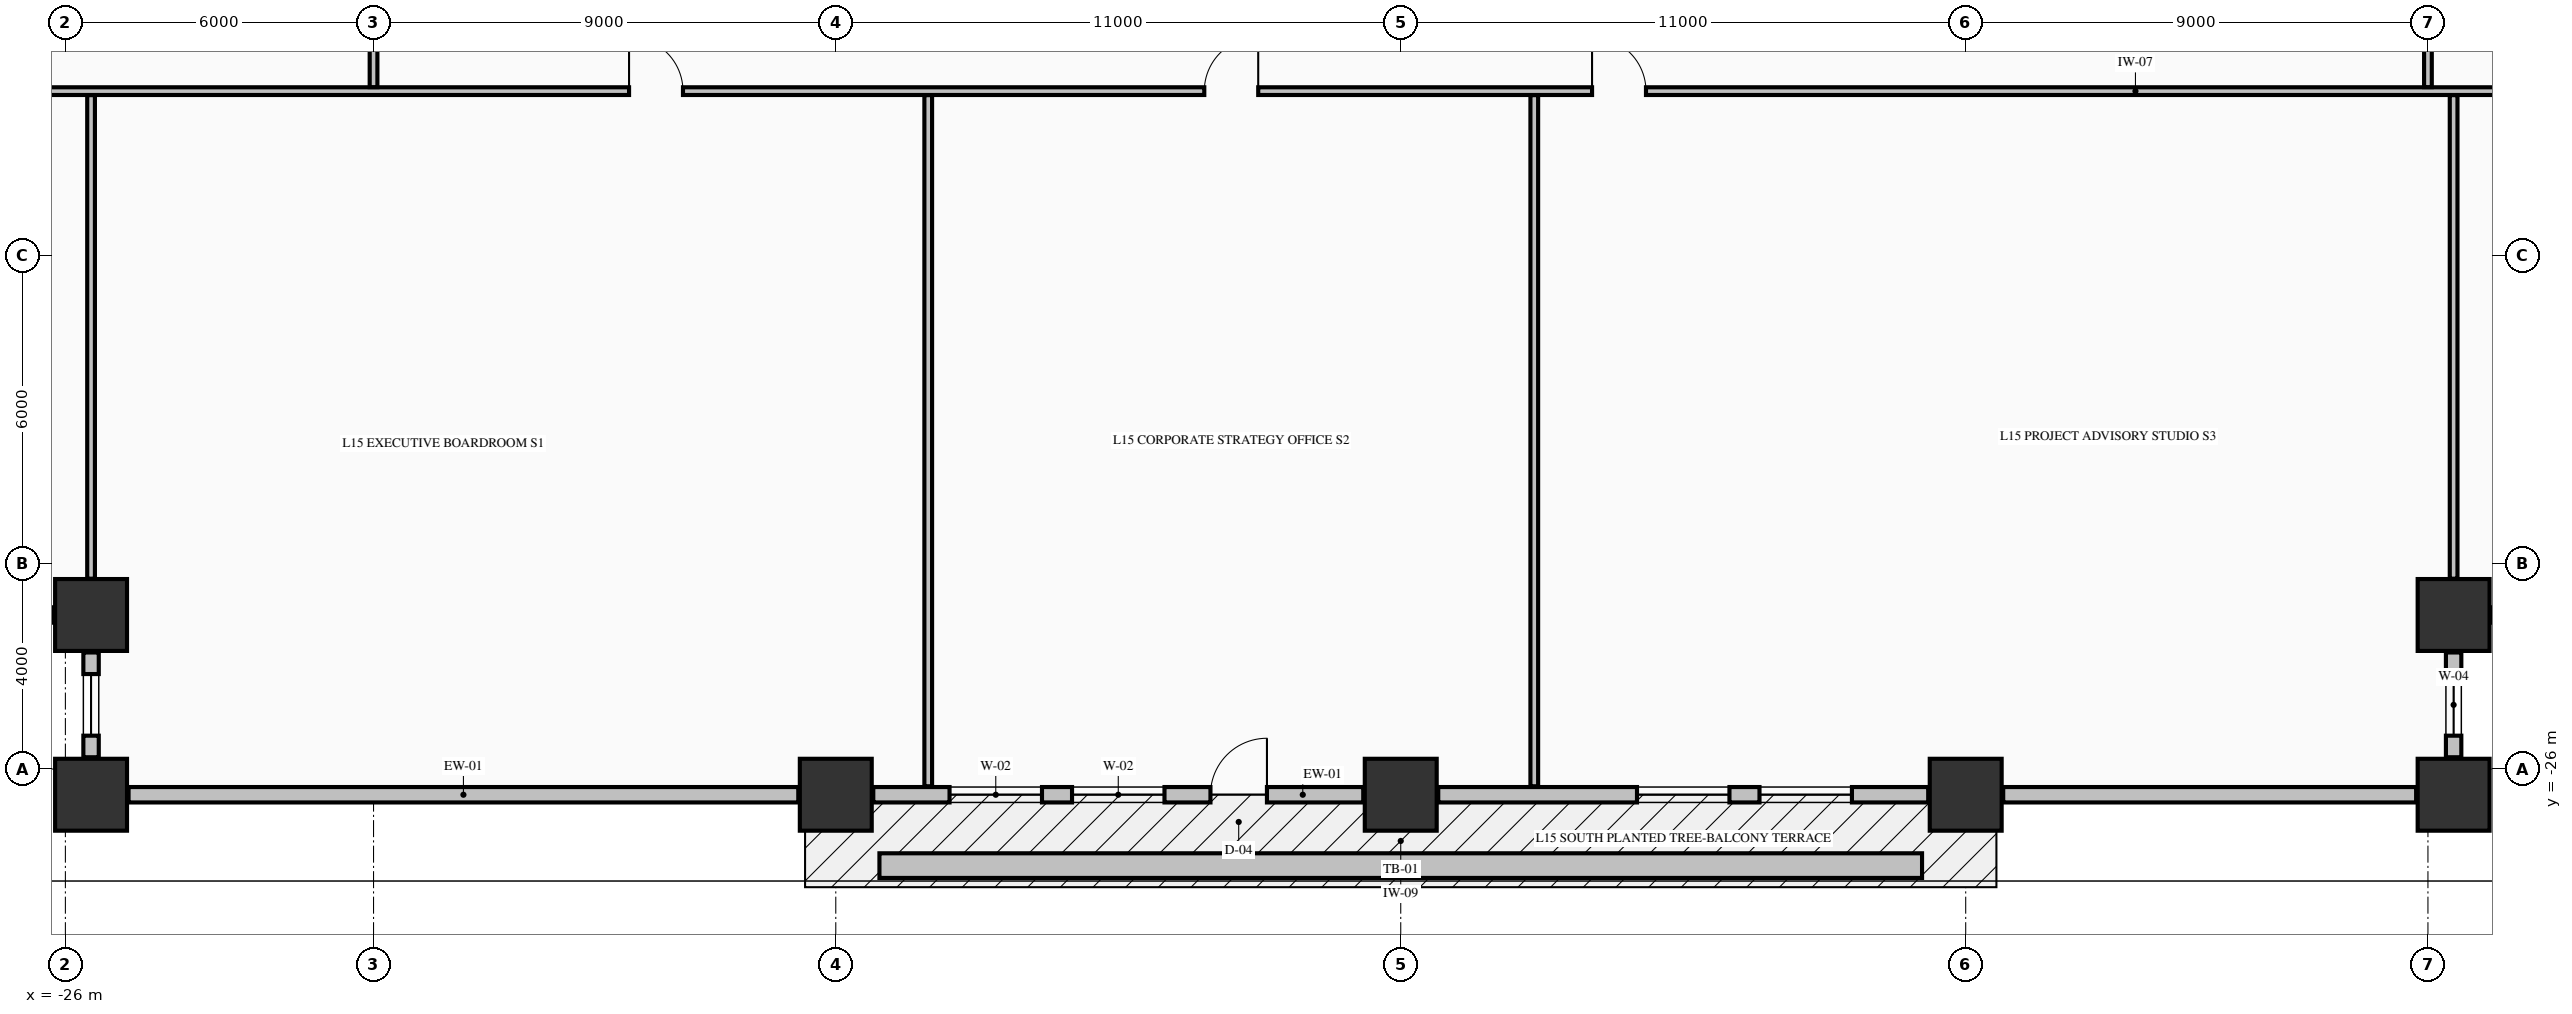
"""IFC4 building model, lengths in metres.
Left out: names, types, materials, properties, quantities, classifications, styles, units other than length and angle.
Written with IfcOpenShell. Run it as: python <this file> out.ifc"""

import sys

from ifc_helpers import new_model, si_unit, direction, frame, frame_2d, origin, origin_2d, place, context, subcontext, project, spatial, rectangle, extrude, element, fill, save


model = new_model("IFC4")
c1 = context("Model", 3, precision=1e-05, world=origin(), true_north=direction((0.0, 1.0)))
c2 = subcontext(c1, "Body", "Model", "MODEL_VIEW")
j1 = project(units=[si_unit("LENGTHUNIT", "METRE"), si_unit("PLANEANGLEUNIT", "RADIAN")], contexts=[c1])
p1 = place(None, origin())
s1 = spatial("IfcSite", under=j1, at=p1, CompositionType="ELEMENT")
p2 = place(p1, origin())
s2 = spatial("IfcBuilding", under=s1, at=p2, CompositionType="ELEMENT")
p3 = place(p2, frame((0.0, 0.0, 64.33)))
s3 = spatial("IfcBuildingStorey", under=s2, at=p3, CompositionType="ELEMENT", Elevation=64.33)
for number, where, z_axis, x_axis in (
    (1, (-25.5, -26.5, -0.25), (0.0, 0.0, 1.0), (1.0, 0.0, 0.0)),
    (2, (-11.0, -26.5, -0.25), (0.0, 0.0, 1.0), (1.0, 0.0, 0.0)),
    (3, (0.0, -26.5, -0.25), (0.0, 0.0, 1.0), (1.0, 0.0, 0.0)),
    (4, (11.0, -26.5, -0.25), (0.0, 0.0, 1.0), (1.0, 0.0, 0.0)),
    (5, (20.5, -26.5, -0.25), (0.0, 0.0, 1.0), (1.0, 0.0, 0.0)),
    (6, (-25.5, -23.0, -0.25), (0.0, 0.0, 1.0), (1.0, 0.0, 0.0)),
    (7, (20.5, -23.0, -0.25), (0.0, 0.0, 1.0), (1.0, 0.0, 0.0)),
):
    element("IfcColumn", number, at=place(p3, frame(where, z_axis=z_axis, x_axis=x_axis)), inside=s3, PredefinedType="COLUMN", context=c2, shape_type="SweptSolid", body=[
        extrude(rectangle(XDim=1.4, YDim=1.4, at=origin_2d()), origin(), (0.0, 0.0, 1.0), 3.57),
    ])
p4 = place(p3, frame((20.5, -25.77, 0.0), z_axis=(0.0, 0.0, 1.0), x_axis=(0.0, 1.0, 0.0)))
e8 = element("IfcWall", 8, at=p4, inside=s3, PredefinedType="STANDARD", context=c2, shape_type="SweptSolid", body=[
    extrude(rectangle(XDim=2.04, YDim=0.3, at=frame_2d((1.02, 0.0))), origin(), (0.0, 0.0, 1.0), 2.712),
])
p5 = place(p4, frame((0.42, 0.0, 0.82)))
e9 = element("IfcOpeningElement", 9, at=p5, cuts=e8, PredefinedType="OPENING", context=c2, shape_type="SweptSolid", body=[
    extrude(rectangle(XDim=1.2, YDim=1.65, at=frame_2d((0.6, 0.825))), frame((0.0, 0.16, 0.0), z_axis=(0.0, -1.0, 0.0), x_axis=(1.0, 0.0, 0.0)), (0.0, 0.0, 1.0), 0.32),
])
p6 = place(p3, frame((21.23, -23.0, 0.0), z_axis=(0.0, 0.0, 1.0), x_axis=(1.0, 0.0, 0.0)))
e10 = element("IfcWall", 10, at=p6, inside=s3, PredefinedType="STANDARD", context=c2, shape_type="SweptSolid", body=[
    extrude(rectangle(XDim=2.04, YDim=0.3, at=frame_2d((1.02, 0.0))), origin(), (0.0, 0.0, 1.0), 2.712),
])
p7 = place(p6, frame((0.42, 0.0, 0.82)))
e11 = element("IfcOpeningElement", 11, at=p7, cuts=e10, PredefinedType="OPENING", context=c2, shape_type="SweptSolid", body=[
    extrude(rectangle(XDim=1.2, YDim=1.65, at=frame_2d((0.6, 0.825))), frame((0.0, 0.16, 0.0), z_axis=(0.0, -1.0, 0.0), x_axis=(1.0, 0.0, 0.0)), (0.0, 0.0, 1.0), 0.32),
])
p8 = place(p3, frame((-28.27, -23.0, 0.0), z_axis=(0.0, 0.0, 1.0), x_axis=(1.0, 0.0, 0.0)))
e12 = element("IfcWall", 12, at=p8, inside=s3, PredefinedType="STANDARD", context=c2, shape_type="SweptSolid", body=[
    extrude(rectangle(XDim=2.04, YDim=0.3, at=frame_2d((1.02, 0.0))), origin(), (0.0, 0.0, 1.0), 2.712),
])
p9 = place(p8, frame((0.42, 0.0, 0.82)))
e13 = element("IfcOpeningElement", 13, at=p9, cuts=e12, PredefinedType="OPENING", context=c2, shape_type="SweptSolid", body=[
    extrude(rectangle(XDim=1.2, YDim=1.65, at=frame_2d((0.6, 0.825))), frame((0.0, 0.16, 0.0), z_axis=(0.0, -1.0, 0.0), x_axis=(1.0, 0.0, 0.0)), (0.0, 0.0, 1.0), 0.32),
])
p10 = place(p3, frame((-25.5, -23.73, 0.0), z_axis=(0.0, 0.0, 1.0), x_axis=(0.0, -1.0, 0.0)))
e14 = element("IfcWall", 14, at=p10, inside=s3, PredefinedType="STANDARD", context=c2, shape_type="SweptSolid", body=[
    extrude(rectangle(XDim=2.04, YDim=0.3, at=frame_2d((1.02, 0.0))), origin(), (0.0, 0.0, 1.0), 2.712),
])
p11 = place(p10, frame((0.42, 0.0, 0.82)))
e15 = element("IfcOpeningElement", 15, at=p11, cuts=e14, PredefinedType="OPENING", context=c2, shape_type="SweptSolid", body=[
    extrude(rectangle(XDim=1.2, YDim=1.65, at=frame_2d((0.6, 0.825))), frame((0.0, 0.16, 0.0), z_axis=(0.0, -1.0, 0.0), x_axis=(1.0, 0.0, 0.0)), (0.0, 0.0, 1.0), 0.32),
])
p12 = place(p3, frame((-24.77, -26.5, 0.0), z_axis=(0.0, 0.0, 1.0), x_axis=(1.0, 0.0, 0.0)))
e16 = element("IfcWall", 16, at=p12, inside=s3, PredefinedType="STANDARD", context=c2, shape_type="SweptSolid", body=[
    extrude(rectangle(XDim=13.04, YDim=0.3, at=frame_2d((6.52, 0.0))), origin(), (0.0, 0.0, 1.0), 2.712),
])
p13 = place(p3, frame((-10.27, -26.5, 0.0), z_axis=(0.0, 0.0, 1.0), x_axis=(1.0, 0.0, 0.0)))
e17 = element("IfcWall", 17, at=p13, inside=s3, PredefinedType="STANDARD", context=c2, shape_type="SweptSolid", body=[
    extrude(rectangle(XDim=9.54, YDim=0.3, at=frame_2d((4.77, 0.0))), origin(), (0.0, 0.0, 1.0), 2.712),
])
p14 = place(p13, frame((6.565, 0.0, 0.0)))
e18 = element("IfcOpeningElement", 18, at=p14, cuts=e17, PredefinedType="OPENING", context=c2, shape_type="SweptSolid", body=[
    extrude(rectangle(XDim=1.1, YDim=2.15, at=frame_2d((0.55, 1.075))), frame((0.0, 0.16, 0.0), z_axis=(0.0, -1.0, 0.0), x_axis=(1.0, 0.0, 0.0)), (0.0, 0.0, 1.0), 0.32),
])
p15 = place(p13, frame((1.485, 0.0, 0.78)))
e19 = element("IfcOpeningElement", 19, at=p15, cuts=e17, PredefinedType="OPENING", context=c2, shape_type="SweptSolid", body=[
    extrude(rectangle(XDim=1.8, YDim=1.72, at=frame_2d((0.9, 0.86))), frame((0.0, 0.16, 0.0), z_axis=(0.0, -1.0, 0.0), x_axis=(1.0, 0.0, 0.0)), (0.0, 0.0, 1.0), 0.32),
])
p16 = place(p13, frame((3.87, 0.0, 0.78)))
e20 = element("IfcOpeningElement", 20, at=p16, cuts=e17, PredefinedType="OPENING", context=c2, shape_type="SweptSolid", body=[
    extrude(rectangle(XDim=1.8, YDim=1.72, at=frame_2d((0.9, 0.86))), frame((0.0, 0.16, 0.0), z_axis=(0.0, -1.0, 0.0), x_axis=(1.0, 0.0, 0.0)), (0.0, 0.0, 1.0), 0.32),
])
p17 = place(p3, frame((0.73, -26.5, 0.0), z_axis=(0.0, 0.0, 1.0), x_axis=(1.0, 0.0, 0.0)))
e21 = element("IfcWall", 21, at=p17, inside=s3, PredefinedType="STANDARD", context=c2, shape_type="SweptSolid", body=[
    extrude(rectangle(XDim=9.54, YDim=0.3, at=frame_2d((4.77, 0.0))), origin(), (0.0, 0.0, 1.0), 2.712),
])
p18 = place(p17, frame((3.87, 0.0, 0.78)))
e22 = element("IfcOpeningElement", 22, at=p18, cuts=e21, PredefinedType="OPENING", context=c2, shape_type="SweptSolid", body=[
    extrude(rectangle(XDim=1.8, YDim=1.72, at=frame_2d((0.9, 0.86))), frame((0.0, 0.16, 0.0), z_axis=(0.0, -1.0, 0.0), x_axis=(1.0, 0.0, 0.0)), (0.0, 0.0, 1.0), 0.32),
])
p19 = place(p17, frame((6.255, 0.0, 0.78)))
e23 = element("IfcOpeningElement", 23, at=p19, cuts=e21, PredefinedType="OPENING", context=c2, shape_type="SweptSolid", body=[
    extrude(rectangle(XDim=1.8, YDim=1.72, at=frame_2d((0.9, 0.86))), frame((0.0, 0.16, 0.0), z_axis=(0.0, -1.0, 0.0), x_axis=(1.0, 0.0, 0.0)), (0.0, 0.0, 1.0), 0.32),
])
p20 = place(p3, frame((11.73, -26.5, 0.0), z_axis=(0.0, 0.0, 1.0), x_axis=(1.0, 0.0, 0.0)))
e24 = element("IfcWall", 24, at=p20, inside=s3, PredefinedType="STANDARD", context=c2, shape_type="SweptSolid", body=[
    extrude(rectangle(XDim=8.04, YDim=0.3, at=frame_2d((4.02, 0.0))), origin(), (0.0, 0.0, 1.0), 2.712),
])
p21 = place(p3, frame((-28.835, -12.8, 0.0), z_axis=(0.0, 0.0, 1.0), x_axis=(1.0, 0.0, 0.0)))
e25 = element("IfcWall", 25, at=p21, inside=s3, PredefinedType="PARTITIONING", context=c2, shape_type="SweptSolid", body=[
    extrude(rectangle(XDim=52.67, YDim=0.15, at=frame_2d((26.335, 0.0))), origin(), (0.0, 0.0, 1.0), 3.32),
])
p22 = place(p21, frame((13.81, 0.0, 0.0)))
e26 = element("IfcOpeningElement", 26, at=p22, cuts=e25, PredefinedType="OPENING", context=c2, shape_type="SweptSolid", body=[
    extrude(rectangle(XDim=1.05, YDim=2.15, at=frame_2d((0.525, 1.075))), frame((0.0, 0.085, 0.0), z_axis=(0.0, -1.0, 0.0), x_axis=(1.0, 0.0, 0.0)), (0.0, 0.0, 1.0), 0.17),
])
p23 = place(p21, frame((25.01, 0.0, 0.0)))
e27 = element("IfcOpeningElement", 27, at=p23, cuts=e25, PredefinedType="OPENING", context=c2, shape_type="SweptSolid", body=[
    extrude(rectangle(XDim=1.05, YDim=2.15, at=frame_2d((0.525, 1.075))), frame((0.0, 0.085, 0.0), z_axis=(0.0, -1.0, 0.0), x_axis=(1.0, 0.0, 0.0)), (0.0, 0.0, 1.0), 0.17),
])
p24 = place(p21, frame((32.56, 0.0, 0.0)))
e28 = element("IfcOpeningElement", 28, at=p24, cuts=e25, PredefinedType="OPENING", context=c2, shape_type="SweptSolid", body=[
    extrude(rectangle(XDim=1.05, YDim=2.15, at=frame_2d((0.525, 1.075))), frame((0.0, 0.085, 0.0), z_axis=(0.0, -1.0, 0.0), x_axis=(1.0, 0.0, 0.0)), (0.0, 0.0, 1.0), 0.17),
])
p25 = place(p3, frame((-25.5, -22.294, 0.0), z_axis=(0.0, 0.0, 1.0), x_axis=(0.0, 1.0, 0.0)))
e29 = element("IfcWall", 29, at=p25, inside=s3, PredefinedType="PARTITIONING", context=c2, shape_type="SweptSolid", body=[
    extrude(rectangle(XDim=9.416, YDim=0.15, at=frame_2d((4.708, 0.0))), origin(), (0.0, 0.0, 1.0), 3.32),
])
p26 = place(p3, frame((-20.0, -12.722, 0.0), z_axis=(0.0, 0.0, 1.0), x_axis=(0.0, 1.0, 0.0)))
e30 = element("IfcWall", 30, at=p26, inside=s3, PredefinedType="PARTITIONING", context=c2, shape_type="SweptSolid", body=[
    extrude(rectangle(XDim=2.166, YDim=0.15, at=frame_2d((1.083, 0.0))), origin(), (0.0, 0.0, 1.0), 2.66),
])
p27 = place(p26, frame((0.867, 0.0, 0.0)))
e31 = element("IfcOpeningElement", 31, at=p27, cuts=e30, PredefinedType="OPENING", context=c2, shape_type="SweptSolid", body=[
    extrude(rectangle(XDim=0.95, YDim=2.15, at=frame_2d((0.475, 1.075))), frame((0.0, 0.085, 0.0), z_axis=(0.0, -1.0, 0.0), x_axis=(1.0, 0.0, 0.0)), (0.0, 0.0, 1.0), 0.17),
])
for number, where, z_axis, x_axis in (
    (32, (-9.2, -26.335, 0.0), (0.0, 0.0, 1.0), (0.0, 1.0, 0.0)),
    (33, (2.6, -26.335, 0.0), (0.0, 0.0, 1.0), (0.0, 1.0, 0.0)),
):
    element("IfcWall", number, at=place(p3, frame(where, z_axis=z_axis, x_axis=x_axis)), inside=s3, PredefinedType="PARTITIONING", context=c2, shape_type="SweptSolid", body=[
        extrude(rectangle(XDim=13.457, YDim=0.15, at=frame_2d((6.729, 0.0))), origin(), (0.0, 0.0, 1.0), 3.32),
    ])
p28 = place(p3, frame((20.0, -12.722, 0.0), z_axis=(0.0, 0.0, 1.0), x_axis=(0.0, 1.0, 0.0)))
e34 = element("IfcWall", 34, at=p28, inside=s3, PredefinedType="PARTITIONING", context=c2, shape_type="SweptSolid", body=[
    extrude(rectangle(XDim=2.166, YDim=0.15, at=frame_2d((1.083, 0.0))), origin(), (0.0, 0.0, 1.0), 3.32),
])
p29 = place(p28, frame((0.867, 0.0, 0.0)))
e35 = element("IfcOpeningElement", 35, at=p29, cuts=e34, PredefinedType="OPENING", context=c2, shape_type="SweptSolid", body=[
    extrude(rectangle(XDim=0.95, YDim=2.15, at=frame_2d((0.475, 1.075))), frame((0.0, 0.085, 0.0), z_axis=(0.0, -1.0, 0.0), x_axis=(1.0, 0.0, 0.0)), (0.0, 0.0, 1.0), 0.17),
])
p30 = place(p3, frame((20.5, -22.294, 0.0), z_axis=(0.0, 0.0, 1.0), x_axis=(0.0, 1.0, 0.0)))
e36 = element("IfcWall", 36, at=p30, inside=s3, PredefinedType="PARTITIONING", context=c2, shape_type="SweptSolid", body=[
    extrude(rectangle(XDim=9.416, YDim=0.15, at=frame_2d((4.708, 0.0))), origin(), (0.0, 0.0, 1.0), 3.32),
])
p31 = place(p3, frame((-10.15, -27.88, -0.04), z_axis=(0.0, 0.0, 1.0), x_axis=(1.0, 0.0, 0.0)))
e37 = element("IfcWall", 37, at=p31, inside=s3, PredefinedType="PARAPET", context=c2, shape_type="SweptSolid", body=[
    extrude(rectangle(XDim=20.3, YDim=0.48, at=frame_2d((10.15, 0.0))), origin(), (0.0, 0.0, 1.0), 0.52),
])
p32 = place(p5, origin())
e38 = element("IfcWindow", 38, at=p32, inside=s3, PartitioningType="SINGLE_PANEL", PredefinedType="WINDOW", context=c2, shape_type="SweptSolid", body=[
    extrude(rectangle(XDim=1.2, YDim=1.65, at=frame_2d((0.6, 0.825))), frame((0.0, 0.03, 0.0), z_axis=(0.0, -1.0, 0.0), x_axis=(1.0, 0.0, 0.0)), (0.0, 0.0, 1.0), 0.06),
])
fill(e9, e38)
p33 = place(p11, origin())
e39 = element("IfcWindow", 39, at=p33, inside=s3, PartitioningType="SINGLE_PANEL", PredefinedType="WINDOW", context=c2, shape_type="SweptSolid", body=[
    extrude(rectangle(XDim=1.2, YDim=1.65, at=frame_2d((0.6, 0.825))), frame((0.0, 0.03, 0.0), z_axis=(0.0, -1.0, 0.0), x_axis=(1.0, 0.0, 0.0)), (0.0, 0.0, 1.0), 0.06),
])
fill(e15, e39)
p34 = place(p14, origin())
e40 = element("IfcDoor", 40, at=p34, inside=s3, OperationType="SINGLE_SWING_RIGHT", PredefinedType="DOOR", context=c2, shape_type="SweptSolid", body=[
    extrude(rectangle(XDim=1.1, YDim=2.15, at=frame_2d((0.55, 1.075))), frame((0.0, 0.025, 0.0), z_axis=(0.0, -1.0, 0.0), x_axis=(1.0, 0.0, 0.0)), (0.0, 0.0, 1.0), 0.05),
])
fill(e18, e40)
p35 = place(p15, origin())
e41 = element("IfcWindow", 41, at=p35, inside=s3, PartitioningType="SINGLE_PANEL", PredefinedType="WINDOW", context=c2, shape_type="SweptSolid", body=[
    extrude(rectangle(XDim=1.8, YDim=1.72, at=frame_2d((0.9, 0.86))), frame((0.0, 0.03, 0.0), z_axis=(0.0, -1.0, 0.0), x_axis=(1.0, 0.0, 0.0)), (0.0, 0.0, 1.0), 0.06),
])
fill(e19, e41)
p36 = place(p16, origin())
e42 = element("IfcWindow", 42, at=p36, inside=s3, PartitioningType="SINGLE_PANEL", PredefinedType="WINDOW", context=c2, shape_type="SweptSolid", body=[
    extrude(rectangle(XDim=1.8, YDim=1.72, at=frame_2d((0.9, 0.86))), frame((0.0, 0.03, 0.0), z_axis=(0.0, -1.0, 0.0), x_axis=(1.0, 0.0, 0.0)), (0.0, 0.0, 1.0), 0.06),
])
fill(e20, e42)
p37 = place(p18, origin())
e43 = element("IfcWindow", 43, at=p37, inside=s3, PartitioningType="SINGLE_PANEL", PredefinedType="WINDOW", context=c2, shape_type="SweptSolid", body=[
    extrude(rectangle(XDim=1.8, YDim=1.72, at=frame_2d((0.9, 0.86))), frame((0.0, 0.03, 0.0), z_axis=(0.0, -1.0, 0.0), x_axis=(1.0, 0.0, 0.0)), (0.0, 0.0, 1.0), 0.06),
])
fill(e22, e43)
p38 = place(p19, origin())
e44 = element("IfcWindow", 44, at=p38, inside=s3, PartitioningType="SINGLE_PANEL", PredefinedType="WINDOW", context=c2, shape_type="SweptSolid", body=[
    extrude(rectangle(XDim=1.8, YDim=1.72, at=frame_2d((0.9, 0.86))), frame((0.0, 0.03, 0.0), z_axis=(0.0, -1.0, 0.0), x_axis=(1.0, 0.0, 0.0)), (0.0, 0.0, 1.0), 0.06),
])
fill(e23, e44)
p39 = place(p22, origin())
e45 = element("IfcDoor", 45, at=p39, inside=s3, OperationType="SINGLE_SWING_LEFT", PredefinedType="DOOR", context=c2, shape_type="SweptSolid", body=[
    extrude(rectangle(XDim=1.05, YDim=2.15, at=frame_2d((0.525, 1.075))), frame((0.0, 0.025, 0.0), z_axis=(0.0, -1.0, 0.0), x_axis=(1.0, 0.0, 0.0)), (0.0, 0.0, 1.0), 0.05),
])
fill(e26, e45)
p40 = place(p23, origin())
e46 = element("IfcDoor", 46, at=p40, inside=s3, OperationType="SINGLE_SWING_RIGHT", PredefinedType="DOOR", context=c2, shape_type="SweptSolid", body=[
    extrude(rectangle(XDim=1.05, YDim=2.15, at=frame_2d((0.525, 1.075))), frame((0.0, 0.025, 0.0), z_axis=(0.0, -1.0, 0.0), x_axis=(1.0, 0.0, 0.0)), (0.0, 0.0, 1.0), 0.05),
])
fill(e27, e46)
p41 = place(p24, origin())
e47 = element("IfcDoor", 47, at=p41, inside=s3, OperationType="SINGLE_SWING_LEFT", PredefinedType="DOOR", context=c2, shape_type="SweptSolid", body=[
    extrude(rectangle(XDim=1.05, YDim=2.15, at=frame_2d((0.525, 1.075))), frame((0.0, 0.025, 0.0), z_axis=(0.0, -1.0, 0.0), x_axis=(1.0, 0.0, 0.0)), (0.0, 0.0, 1.0), 0.05),
])
fill(e28, e47)
save(model, sys.argv[1])
